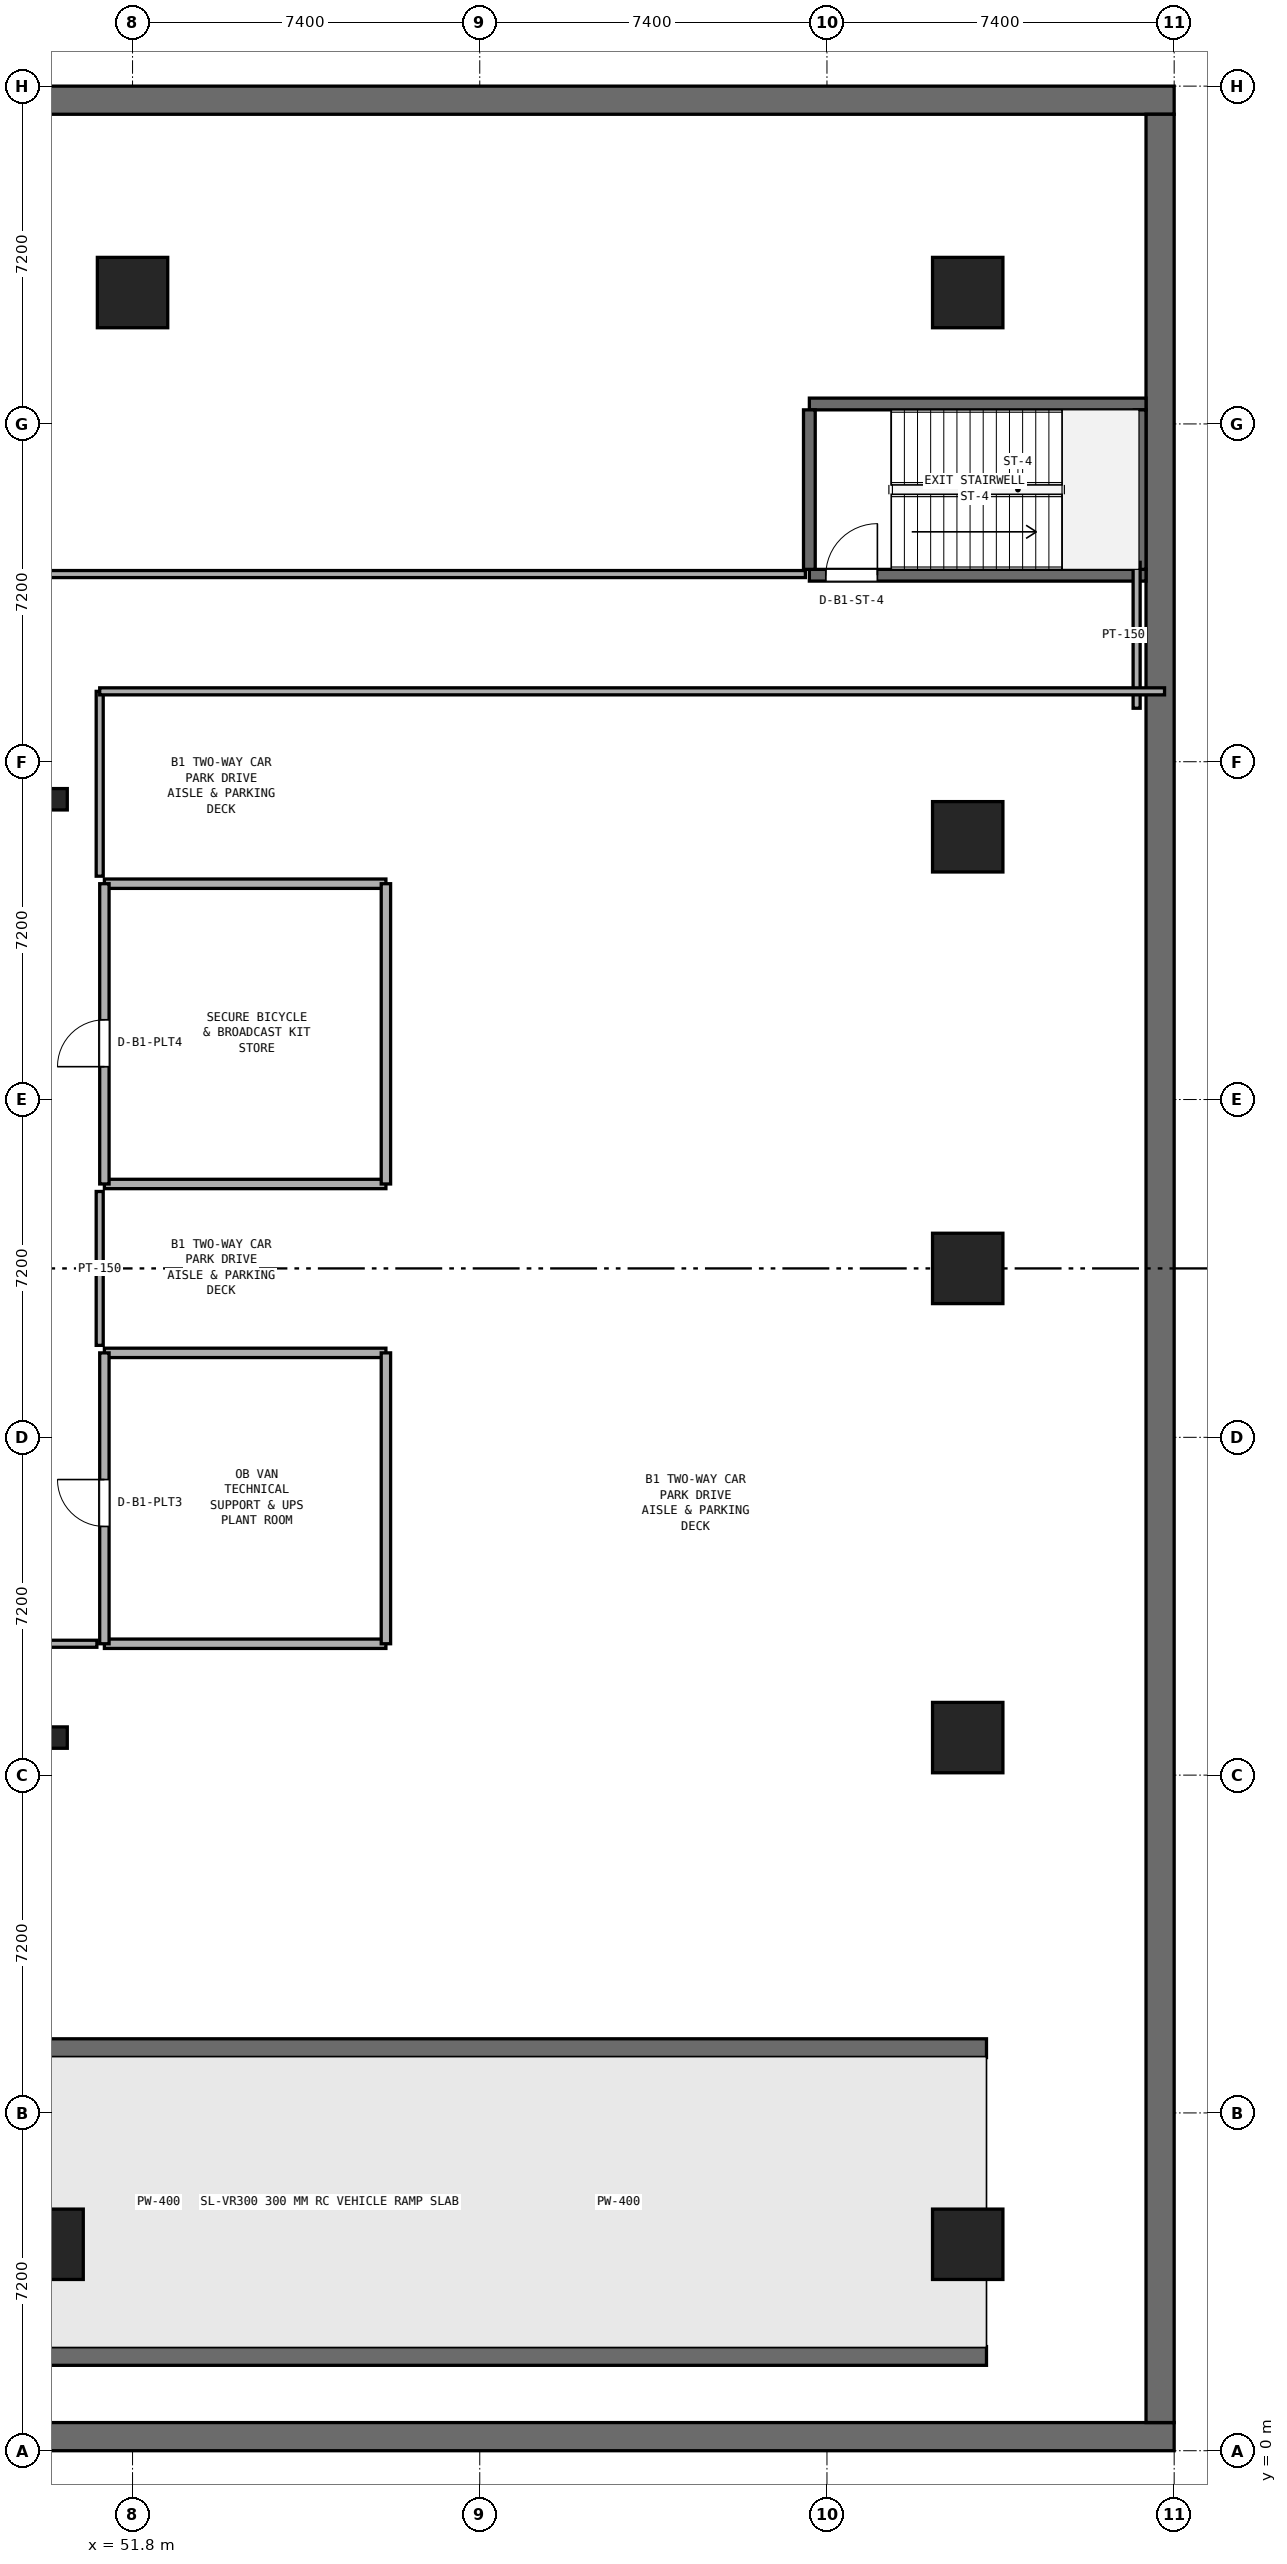
"""IFC4 building model, lengths in metres.
Left out: names, types, materials, properties, quantities, classifications, styles, units other than length and angle.
Written with IfcOpenShell. Run it as: python <this file> out.ifc"""

import sys

from ifc_helpers import new_model, si_unit, direction, frame, frame_2d, origin, origin_2d, place, context, subcontext, project, spatial, rectangle, i_section, extrude, element, fill, save


model = new_model("IFC4")
c1 = context("Model", 3, precision=1e-05, world=origin(), true_north=direction((0.0, 1.0)))
c2 = subcontext(c1, "Body", "Model", "MODEL_VIEW")
j1 = project(units=[si_unit("LENGTHUNIT", "METRE"), si_unit("PLANEANGLEUNIT", "RADIAN")], contexts=[c1])
p1 = place(None, origin())
s1 = spatial("IfcSite", under=j1, at=p1, CompositionType="ELEMENT")
p2 = place(p1, origin())
s2 = spatial("IfcBuilding", under=s1, at=p2, CompositionType="ELEMENT")
p3 = place(p2, frame((0.0, 0.0, -4.8)))
s3 = spatial("IfcBuildingStorey", under=s2, at=p3, CompositionType="ELEMENT", Elevation=-4.8)
for number, where, z_axis, x_axis in (
    (1, (0.0, 0.3, 0.0), (0.0, 0.0, 1.0), (1.0, 0.0, 0.0)),
    (2, (0.0, 50.1, 0.0), (0.0, 0.0, 1.0), (1.0, 0.0, 0.0)),
):
    element("IfcWall", number, at=place(p3, frame(where, z_axis=z_axis, x_axis=x_axis)), inside=s3, PredefinedType="SOLIDWALL", context=c2, shape_type="SweptSolid", body=[
        extrude(rectangle(XDim=74.0, YDim=0.6, at=frame_2d((37.0, 0.0))), origin(), (0.0, 0.0, 1.0), 4.45),
    ])
p4 = place(p3, frame((73.7, 0.6, 0.0), z_axis=(0.0, 0.0, 1.0), x_axis=(0.0, 1.0, 0.0)))
e3 = element("IfcWall", 3, at=p4, inside=s3, PredefinedType="SOLIDWALL", context=c2, shape_type="SweptSolid", body=[
    extrude(rectangle(XDim=49.2, YDim=0.6, at=frame_2d((24.6, 0.0))), origin(), (0.0, 0.0, 1.0), 4.45),
])
for number, where, z_axis, x_axis in (
    (4, (50.0, 4.4, 0.0), (0.0, 0.0, 1.0), (1.0, 0.0, 0.0)),
    (5, (69.6, 4.4, 0.0), (0.0, 0.0, 1.0), (1.0, 0.0, 0.0)),
    (6, (51.8, 46.0, 0.0), (0.0, 0.0, 1.0), (1.0, 0.0, 0.0)),
    (7, (69.6, 46.0, 0.0), (0.0, 0.0, 1.0), (1.0, 0.0, 0.0)),
    (8, (69.6, 15.2, 0.0), (0.0, 0.0, 1.0), (1.0, 0.0, 0.0)),
    (9, (69.6, 25.2, 0.0), (0.0, 0.0, 1.0), (1.0, 0.0, 0.0)),
    (10, (69.6, 34.4, 0.0), (0.0, 0.0, 1.0), (1.0, 0.0, 0.0)),
):
    element("IfcColumn", number, at=place(p3, frame(where, z_axis=z_axis, x_axis=x_axis)), inside=s3, PredefinedType="COLUMN", context=c2, shape_type="SweptSolid", body=[
        extrude(rectangle(XDim=1.5, YDim=1.5, at=origin_2d()), origin(), (0.0, 0.0, 1.0), 4.8),
    ])
for number, where, z_axis, x_axis in (
    (11, (50.2, 15.2, 0.0), (0.0, 0.0, 1.0), (1.0, 0.0, 0.0)),
    (12, (50.2, 35.2, 0.0), (0.0, 0.0, 1.0), (1.0, 0.0, 0.0)),
):
    element("IfcColumn", number, at=place(p3, frame(where, z_axis=z_axis, x_axis=x_axis)), inside=s3, PredefinedType="COLUMN", context=c2, shape_type="SweptSolid", body=[
        extrude(i_section(OverallWidth=0.418, OverallDepth=0.456, WebThickness=0.042, FlangeThickness=0.067, at=origin_2d()), origin(), (0.0, 0.0, 1.0), 4.8),
    ])
p5 = place(p3, frame((52.64, 2.35, 0.0), z_axis=(0.0, 0.0, 1.0), x_axis=(0.0, 1.0, 0.0)))
e13 = element("IfcWall", 13, at=p5, inside=s3, PredefinedType="SOLIDWALL", context=c2, shape_type="SweptSolid", body=[
    extrude(rectangle(XDim=5.9, YDim=0.4, at=frame_2d((2.95, 0.0))), origin(), (0.0, 0.0, 1.0), 1.504),
])
p6 = place(p3, frame((62.16, 2.35, 0.0), z_axis=(0.0, 0.0, 1.0), x_axis=(0.0, 1.0, 0.0)))
e14 = element("IfcWall", 14, at=p6, inside=s3, PredefinedType="SOLIDWALL", context=c2, shape_type="SweptSolid", body=[
    extrude(rectangle(XDim=5.9, YDim=0.4, at=frame_2d((2.95, 0.0))), origin(), (0.0, 0.0, 1.0), 3.136),
])
for number, where, z_axis, x_axis in (
    (15, (42.0, 2.02, 0.0), (0.0, 0.0, 1.0), (1.0, 0.0, 0.0)),
    (16, (42.0, 8.58, 0.0), (0.0, 0.0, 1.0), (1.0, 0.0, 0.0)),
):
    element("IfcWall", number, at=place(p3, frame(where, z_axis=z_axis, x_axis=x_axis)), inside=s3, PredefinedType="SOLIDWALL", context=c2, shape_type="SweptSolid", body=[
        extrude(rectangle(XDim=28.0, YDim=0.4, at=frame_2d((14.0, 0.0))), origin(), (0.0, 0.0, 1.0), 4.45),
    ])
p7 = place(p3, frame((66.225, 39.975, 0.0), z_axis=(0.0, 0.0, 1.0), x_axis=(1.0, 0.0, 0.0)))
e17 = element("IfcWall", 17, at=p7, inside=s3, PredefinedType="SHEAR", context=c2, shape_type="SweptSolid", body=[
    extrude(rectangle(XDim=7.175, YDim=0.25, at=frame_2d((3.587, 0.0))), origin(), (0.0, 0.0, 1.0), 4.45),
])
p8 = place(p7, frame((0.35, 0.0, 0.0)))
e18 = element("IfcOpeningElement", 18, at=p8, cuts=e17, PredefinedType="OPENING", context=c2, shape_type="SweptSolid", body=[
    extrude(rectangle(XDim=1.1, YDim=2.15, at=frame_2d((0.55, 1.075))), frame((0.0, 0.135, 0.0), z_axis=(0.0, -1.0, 0.0), x_axis=(1.0, 0.0, 0.0)), (0.0, 0.0, 1.0), 0.27),
])
p9 = place(p3, frame((66.225, 43.625, 0.0), z_axis=(0.0, 0.0, 1.0), x_axis=(1.0, 0.0, 0.0)))
e19 = element("IfcWall", 19, at=p9, inside=s3, PredefinedType="SHEAR", context=c2, shape_type="SweptSolid", body=[
    extrude(rectangle(XDim=7.175, YDim=0.25, at=frame_2d((3.587, 0.0))), origin(), (0.0, 0.0, 1.0), 4.45),
])
for number, where, z_axis, x_axis in (
    (20, (66.225, 40.1, 0.0), (0.0, 0.0, 1.0), (0.0, 1.0, 0.0)),
    (21, (73.275, 40.1, 0.0), (0.0, 0.0, 1.0), (0.0, 1.0, 0.0)),
):
    element("IfcWall", number, at=place(p3, frame(where, z_axis=z_axis, x_axis=x_axis)), inside=s3, PredefinedType="SHEAR", context=c2, shape_type="SweptSolid", body=[
        extrude(rectangle(XDim=3.4, YDim=0.25, at=frame_2d((1.7, 0.0))), origin(), (0.0, 0.0, 1.0), 4.45),
    ])
for number, where, z_axis, x_axis in (
    (22, (51.2, 17.2, 0.0), (0.0, 0.0, 1.0), (1.0, 0.0, 0.0)),
    (23, (51.2, 23.4, 0.0), (0.0, 0.0, 1.0), (1.0, 0.0, 0.0)),
):
    element("IfcWall", number, at=place(p3, frame(where, z_axis=z_axis, x_axis=x_axis)), inside=s3, PredefinedType="SOLIDWALL", context=c2, shape_type="SweptSolid", body=[
        extrude(rectangle(XDim=6.0, YDim=0.2, at=frame_2d((3.0, 0.0))), origin(), (0.0, 0.0, 1.0), 4.45),
    ])
p10 = place(p3, frame((51.2, 17.2, 0.0), z_axis=(0.0, 0.0, 1.0), x_axis=(0.0, 1.0, 0.0)))
e24 = element("IfcWall", 24, at=p10, inside=s3, PredefinedType="SOLIDWALL", context=c2, shape_type="SweptSolid", body=[
    extrude(rectangle(XDim=6.2, YDim=0.2, at=frame_2d((3.1, 0.0))), origin(), (0.0, 0.0, 1.0), 4.45),
])
p11 = place(p10, frame((2.5, 0.0, 0.0)))
e25 = element("IfcOpeningElement", 25, at=p11, cuts=e24, PredefinedType="OPENING", context=c2, shape_type="SweptSolid", body=[
    extrude(rectangle(XDim=1.0, YDim=2.12, at=frame_2d((0.5, 1.06))), frame((0.0, 0.11, 0.0), z_axis=(0.0, -1.0, 0.0), x_axis=(1.0, 0.0, 0.0)), (0.0, 0.0, 1.0), 0.22),
])
p12 = place(p3, frame((57.2, 17.2, 0.0), z_axis=(0.0, 0.0, 1.0), x_axis=(0.0, 1.0, 0.0)))
e26 = element("IfcWall", 26, at=p12, inside=s3, PredefinedType="SOLIDWALL", context=c2, shape_type="SweptSolid", body=[
    extrude(rectangle(XDim=6.2, YDim=0.2, at=frame_2d((3.1, 0.0))), origin(), (0.0, 0.0, 1.0), 4.45),
])
p13 = place(p3, frame((51.2, 27.0, 0.0), z_axis=(0.0, 0.0, 1.0), x_axis=(1.0, 0.0, 0.0)))
e27 = element("IfcWall", 27, at=p13, inside=s3, PredefinedType="SOLIDWALL", context=c2, shape_type="SweptSolid", body=[
    extrude(rectangle(XDim=6.0, YDim=0.2, at=frame_2d((3.0, 0.0))), origin(), (0.0, 0.0, 1.0), 3.55),
])
p14 = place(p3, frame((51.2, 33.4, 0.0), z_axis=(0.0, 0.0, 1.0), x_axis=(1.0, 0.0, 0.0)))
e28 = element("IfcWall", 28, at=p14, inside=s3, PredefinedType="SOLIDWALL", context=c2, shape_type="SweptSolid", body=[
    extrude(rectangle(XDim=6.0, YDim=0.2, at=frame_2d((3.0, 0.0))), origin(), (0.0, 0.0, 1.0), 4.45),
])
p15 = place(p3, frame((51.2, 27.0, 0.0), z_axis=(0.0, 0.0, 1.0), x_axis=(0.0, 1.0, 0.0)))
e29 = element("IfcWall", 29, at=p15, inside=s3, PredefinedType="SOLIDWALL", context=c2, shape_type="SweptSolid", body=[
    extrude(rectangle(XDim=6.4, YDim=0.2, at=frame_2d((3.2, 0.0))), origin(), (0.0, 0.0, 1.0), 4.45),
])
p16 = place(p15, frame((2.5, 0.0, 0.0)))
e30 = element("IfcOpeningElement", 30, at=p16, cuts=e29, PredefinedType="OPENING", context=c2, shape_type="SweptSolid", body=[
    extrude(rectangle(XDim=1.0, YDim=2.12, at=frame_2d((0.5, 1.06))), frame((0.0, 0.11, 0.0), z_axis=(0.0, -1.0, 0.0), x_axis=(1.0, 0.0, 0.0)), (0.0, 0.0, 1.0), 0.22),
])
p17 = place(p3, frame((57.2, 27.0, 0.0), z_axis=(0.0, 0.0, 1.0), x_axis=(0.0, 1.0, 0.0)))
e31 = element("IfcWall", 31, at=p17, inside=s3, PredefinedType="SOLIDWALL", context=c2, shape_type="SweptSolid", body=[
    extrude(rectangle(XDim=6.4, YDim=0.2, at=frame_2d((3.2, 0.0))), origin(), (0.0, 0.0, 1.0), 4.45),
])
p18 = place(p3, frame((73.2, 37.14, 0.0), z_axis=(0.0, 0.0, 1.0), x_axis=(0.0, 1.0, 0.0)))
e32 = element("IfcWall", 32, at=p18, inside=s3, PredefinedType="PARTITIONING", context=c2, shape_type="SweptSolid", body=[
    extrude(rectangle(XDim=3.11, YDim=0.15, at=frame_2d((1.555, 0.0))), origin(), (0.0, 0.0, 1.0), 4.45),
])
p19 = place(p3, frame((51.1, 23.56, 0.0), z_axis=(0.0, 0.0, 1.0), x_axis=(0.0, 1.0, 0.0)))
e33 = element("IfcWall", 33, at=p19, inside=s3, PredefinedType="PARTITIONING", context=c2, shape_type="SweptSolid", body=[
    extrude(rectangle(XDim=3.28, YDim=0.15, at=frame_2d((1.64, 0.0))), origin(), (0.0, 0.0, 1.0), 4.45),
])
p20 = place(p3, frame((51.1, 33.56, 0.0), z_axis=(0.0, 0.0, 1.0), x_axis=(0.0, 1.0, 0.0)))
e34 = element("IfcWall", 34, at=p20, inside=s3, PredefinedType="PARTITIONING", context=c2, shape_type="SweptSolid", body=[
    extrude(rectangle(XDim=3.94, YDim=0.15, at=frame_2d((1.97, 0.0))), origin(), (0.0, 0.0, 1.0), 4.45),
])
p21 = place(p3, frame((48.74, 17.2, 0.0), z_axis=(0.0, 0.0, 1.0), x_axis=(1.0, 0.0, 0.0)))
e35 = element("IfcWall", 35, at=p21, inside=s3, PredefinedType="PARTITIONING", context=c2, shape_type="SweptSolid", body=[
    extrude(rectangle(XDim=2.3, YDim=0.15, at=frame_2d((1.15, 0.0))), origin(), (0.0, 0.0, 1.0), 4.45),
])
p22 = place(p3, frame((51.1, 37.5, 0.0), z_axis=(0.0, 0.0, 1.0), x_axis=(1.0, 0.0, 0.0)))
e36 = element("IfcWall", 36, at=p22, inside=s3, PredefinedType="PARTITIONING", context=c2, shape_type="SweptSolid", body=[
    extrude(rectangle(XDim=22.695, YDim=0.15, at=frame_2d((11.347, 0.0))), origin(), (0.0, 0.0, 1.0), 4.45),
])
p23 = place(p3, frame((8.46, 40.0, 0.0), z_axis=(0.0, 0.0, 1.0), x_axis=(1.0, 0.0, 0.0)))
e37 = element("IfcWall", 37, at=p23, inside=s3, PredefinedType="PARTITIONING", context=c2, shape_type="SweptSolid", body=[
    extrude(rectangle(XDim=57.68, YDim=0.15, at=frame_2d((28.84, 0.0))), origin(), (0.0, 0.0, 1.0), 4.45),
])
p24 = place(p23, frame((28.09, 0.0, 0.0)))
e38 = element("IfcOpeningElement", 38, at=p24, cuts=e37, PredefinedType="OPENING", context=c2, shape_type="SweptSolid", body=[
    extrude(rectangle(XDim=1.5, YDim=2.15, at=frame_2d((0.75, 1.075))), frame((0.0, 0.085, 0.0), z_axis=(0.0, -1.0, 0.0), x_axis=(1.0, 0.0, 0.0)), (0.0, 0.0, 1.0), 0.17),
])
p25 = place(p8, origin())
e39 = element("IfcDoor", 39, at=p25, inside=s3, OperationType="SINGLE_SWING_RIGHT", PredefinedType="DOOR", context=c2, shape_type="SweptSolid", body=[
    extrude(rectangle(XDim=1.1, YDim=2.15, at=frame_2d((0.55, 1.075))), frame((0.0, 0.025, 0.0), z_axis=(0.0, -1.0, 0.0), x_axis=(1.0, 0.0, 0.0)), (0.0, 0.0, 1.0), 0.05),
])
fill(e18, e39)
p26 = place(p11, origin())
e40 = element("IfcDoor", 40, at=p26, inside=s3, OperationType="SINGLE_SWING_RIGHT", PredefinedType="DOOR", context=c2, shape_type="SweptSolid", body=[
    extrude(rectangle(XDim=1.0, YDim=2.12, at=frame_2d((0.5, 1.06))), frame((0.0, 0.025, 0.0), z_axis=(0.0, -1.0, 0.0), x_axis=(1.0, 0.0, 0.0)), (0.0, 0.0, 1.0), 0.05),
])
fill(e25, e40)
p27 = place(p16, origin())
e41 = element("IfcDoor", 41, at=p27, inside=s3, OperationType="SINGLE_SWING_LEFT", PredefinedType="DOOR", context=c2, shape_type="SweptSolid", body=[
    extrude(rectangle(XDim=1.0, YDim=2.12, at=frame_2d((0.5, 1.06))), frame((0.0, 0.025, 0.0), z_axis=(0.0, -1.0, 0.0), x_axis=(1.0, 0.0, 0.0)), (0.0, 0.0, 1.0), 0.05),
])
fill(e30, e41)
save(model, sys.argv[1])
